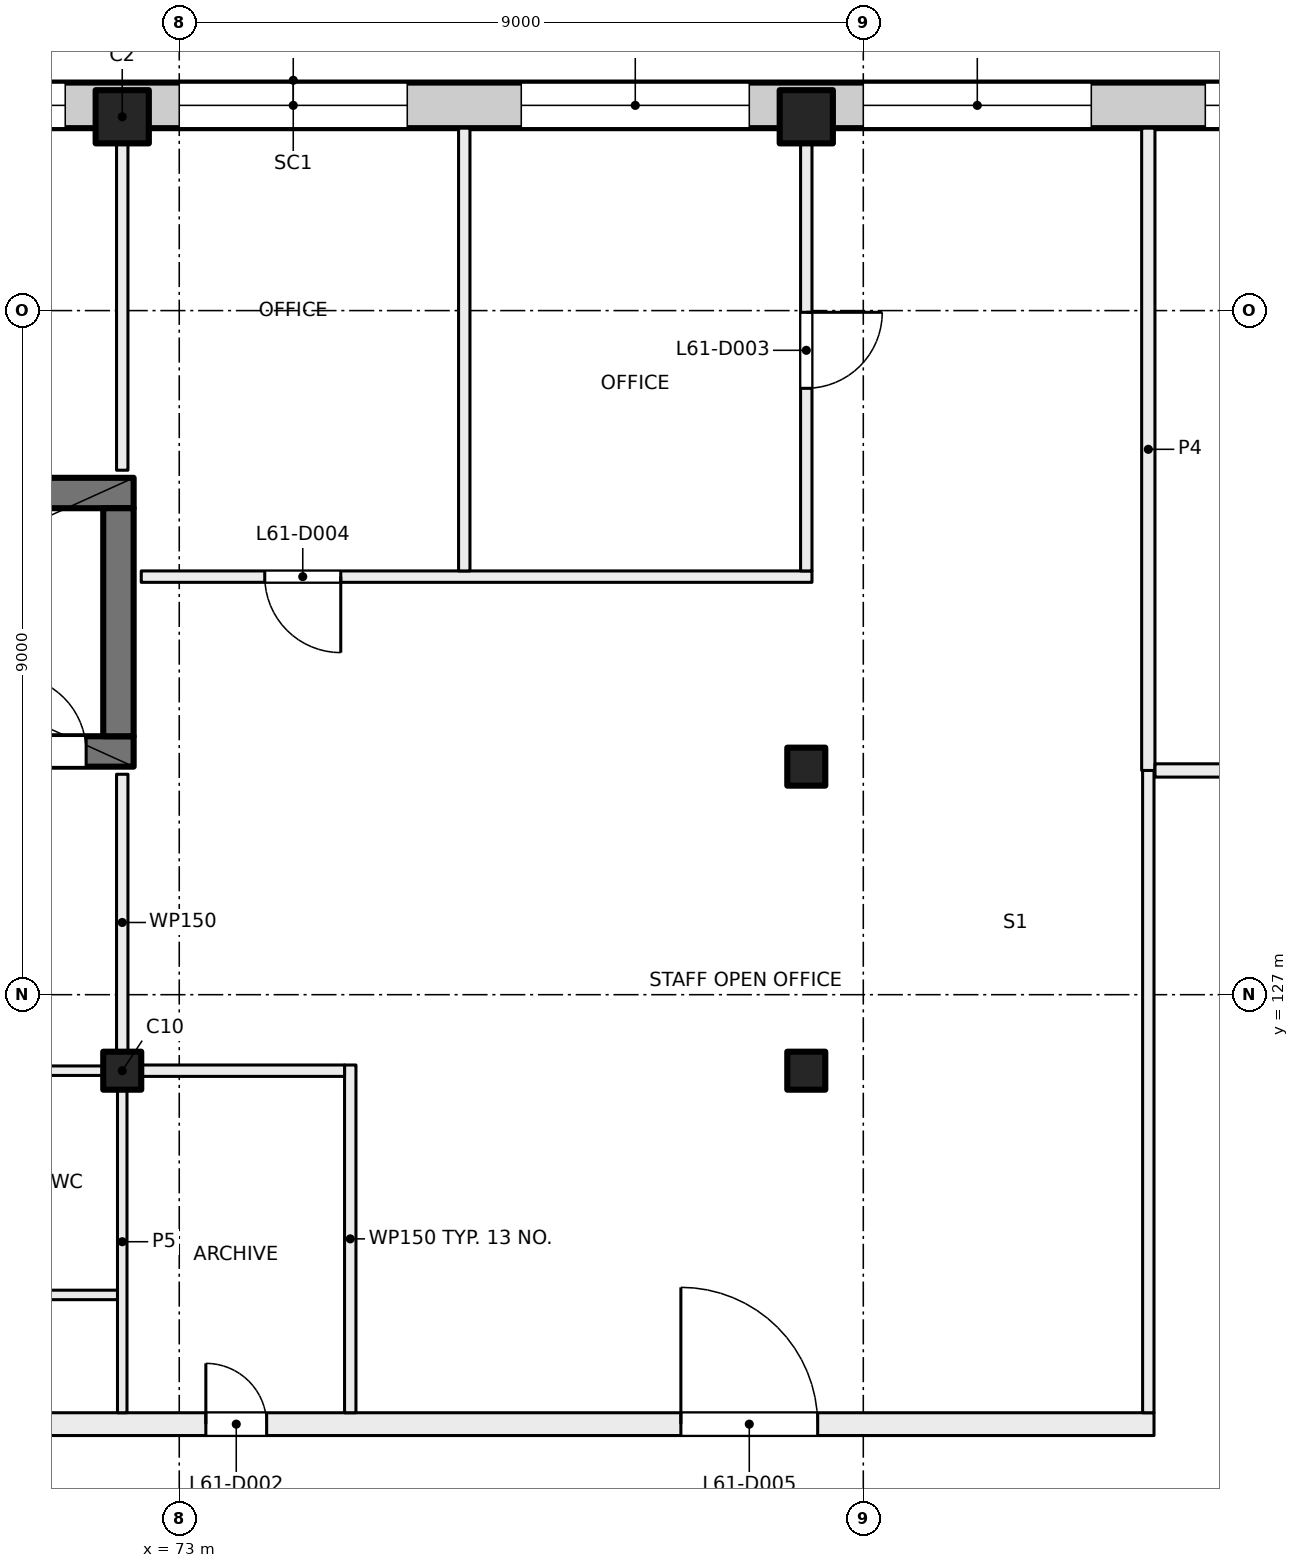
"""IFC4 building model, lengths in metres.
Left out: names, types, materials, properties, quantities, classifications, styles, units other than length and angle.
Written with IfcOpenShell. Run it as: python <this file> out.ifc"""

import sys

from ifc_helpers import new_model, si_unit, direction, frame, frame_2d, origin, origin_2d, place, context, subcontext, project, spatial, rectangle, extrude, element, fill, save


model = new_model("IFC4")
c1 = context("Model", 3, precision=1e-05, world=origin(), true_north=direction((0.0, 1.0)))
c2 = subcontext(c1, "Body", "Model", "MODEL_VIEW")
j1 = project(units=[si_unit("LENGTHUNIT", "METRE"), si_unit("PLANEANGLEUNIT", "RADIAN")], contexts=[c1])
p1 = place(None, origin())
s1 = spatial("IfcSite", under=j1, at=p1, CompositionType="ELEMENT")
p2 = place(p1, origin())
s2 = spatial("IfcBuilding", under=s1, at=p2, CompositionType="ELEMENT")
p3 = place(p2, frame((0.0, 0.0, 257.5)))
s3 = spatial("IfcBuildingStorey", under=s2, at=p3, CompositionType="ELEMENT", Elevation=257.5)
for number, where, z_axis, x_axis in (
    (1, (81.25, 130.0, 0.0), (0.0, 0.0, 1.0), (1.0, 0.0, 0.0)),
    (2, (72.25, 126.0, 0.0), (0.0, 0.0, 1.0), (1.0, 0.0, 0.0)),
    (3, (81.25, 126.0, 0.0), (0.0, 0.0, 1.0), (1.0, 0.0, 0.0)),
):
    element("IfcColumn", number, at=place(p3, frame(where, z_axis=z_axis, x_axis=x_axis)), inside=s3, PredefinedType="COLUMN", context=c2, shape_type="SweptSolid", body=[
        extrude(rectangle(XDim=0.5, YDim=0.5, at=origin_2d()), origin(), (0.0, 0.0, 1.0), 4.0),
    ])
for number, where, z_axis, x_axis in (
    (4, (72.25, 138.55, 0.0), (0.0, 0.0, 1.0), (1.0, 0.0, 0.0)),
    (5, (81.25, 138.55, 0.0), (0.0, 0.0, 1.0), (1.0, 0.0, 0.0)),
):
    element("IfcColumn", number, at=place(p3, frame(where, z_axis=z_axis, x_axis=x_axis)), inside=s3, PredefinedType="COLUMN", context=c2, shape_type="SweptSolid", body=[
        extrude(rectangle(XDim=0.7, YDim=0.7, at=origin_2d()), origin(), (0.0, 0.0, 1.0), 4.0),
    ])
p4 = place(p3, frame((63.5, 130.2, 0.0), z_axis=(0.0, 0.0, 1.0), x_axis=(1.0, 0.0, 0.0)))
e6 = element("IfcWall", 6, at=p4, inside=s3, PredefinedType="SHEAR", context=c2, shape_type="SweptSolid", body=[
    extrude(rectangle(XDim=8.9, YDim=0.4, at=frame_2d((4.45, 0.0))), origin(), (0.0, 0.0, 1.0), 4.0),
])
p5 = place(p4, frame((7.275, 0.0, 0.0)))
e7 = element("IfcOpeningElement", 7, at=p5, cuts=e6, PredefinedType="OPENING", context=c2, shape_type="SweptSolid", body=[
    extrude(rectangle(XDim=1.0, YDim=2.1, at=frame_2d((0.5, 1.05))), frame((0.0, 0.21, 0.0), z_axis=(0.0, -1.0, 0.0), x_axis=(1.0, 0.0, 0.0)), (0.0, 0.0, 1.0), 0.42),
])
p6 = place(p3, frame((64.0, 133.6, 0.0), z_axis=(0.0, 0.0, 1.0), x_axis=(1.0, 0.0, 0.0)))
e8 = element("IfcWall", 8, at=p6, inside=s3, PredefinedType="SHEAR", context=c2, shape_type="SweptSolid", body=[
    extrude(rectangle(XDim=8.4, YDim=0.4, at=frame_2d((4.2, 0.0))), origin(), (0.0, 0.0, 1.0), 4.0),
])
p7 = place(p3, frame((72.2, 130.4, 0.0), z_axis=(0.0, 0.0, 1.0), x_axis=(0.0, 1.0, 0.0)))
e9 = element("IfcWall", 9, at=p7, inside=s3, PredefinedType="SHEAR", context=c2, shape_type="SweptSolid", body=[
    extrude(rectangle(XDim=3.0, YDim=0.4, at=frame_2d((1.5, 0.0))), origin(), (0.0, 0.0, 1.0), 4.0),
])
p8 = place(p3, frame((47.07, 138.7, 0.0), z_axis=(0.0, 0.0, 1.0), x_axis=(1.0, 0.0, 0.0)))
e10 = element("IfcWall", 10, at=p8, inside=s3, PredefinedType="SOLIDWALL", context=c2, shape_type="SweptSolid", body=[
    extrude(rectangle(XDim=43.91, YDim=0.6, at=frame_2d((21.955, 0.0))), origin(), (0.0, 0.0, 1.0), 3.625),
])
p9 = place(p8, frame((3.43, 0.0, 0.9)))
e11 = element("IfcOpeningElement", 11, at=p9, cuts=e10, PredefinedType="OPENING", context=c2, shape_type="SweptSolid", body=[
    extrude(rectangle(XDim=3.0, YDim=2.4, at=frame_2d((1.5, 1.2))), frame((0.0, 0.31, 0.0), z_axis=(0.0, -1.0, 0.0), x_axis=(1.0, 0.0, 0.0)), (0.0, 0.0, 1.0), 0.62),
])
p10 = place(p8, frame((7.93, 0.0, 0.9)))
e12 = element("IfcOpeningElement", 12, at=p10, cuts=e10, PredefinedType="OPENING", context=c2, shape_type="SweptSolid", body=[
    extrude(rectangle(XDim=3.0, YDim=2.4, at=frame_2d((1.5, 1.2))), frame((0.0, 0.31, 0.0), z_axis=(0.0, -1.0, 0.0), x_axis=(1.0, 0.0, 0.0)), (0.0, 0.0, 1.0), 0.62),
])
p11 = place(p8, frame((12.43, 0.0, 0.9)))
e13 = element("IfcOpeningElement", 13, at=p11, cuts=e10, PredefinedType="OPENING", context=c2, shape_type="SweptSolid", body=[
    extrude(rectangle(XDim=3.0, YDim=2.4, at=frame_2d((1.5, 1.2))), frame((0.0, 0.31, 0.0), z_axis=(0.0, -1.0, 0.0), x_axis=(1.0, 0.0, 0.0)), (0.0, 0.0, 1.0), 0.62),
])
p12 = place(p8, frame((16.93, 0.0, 0.9)))
e14 = element("IfcOpeningElement", 14, at=p12, cuts=e10, PredefinedType="OPENING", context=c2, shape_type="SweptSolid", body=[
    extrude(rectangle(XDim=3.0, YDim=2.4, at=frame_2d((1.5, 1.2))), frame((0.0, 0.31, 0.0), z_axis=(0.0, -1.0, 0.0), x_axis=(1.0, 0.0, 0.0)), (0.0, 0.0, 1.0), 0.62),
])
p13 = place(p8, frame((21.43, 0.0, 0.9)))
e15 = element("IfcOpeningElement", 15, at=p13, cuts=e10, PredefinedType="OPENING", context=c2, shape_type="SweptSolid", body=[
    extrude(rectangle(XDim=3.0, YDim=2.4, at=frame_2d((1.5, 1.2))), frame((0.0, 0.31, 0.0), z_axis=(0.0, -1.0, 0.0), x_axis=(1.0, 0.0, 0.0)), (0.0, 0.0, 1.0), 0.62),
])
p14 = place(p8, frame((25.93, 0.0, 0.9)))
e16 = element("IfcOpeningElement", 16, at=p14, cuts=e10, PredefinedType="OPENING", context=c2, shape_type="SweptSolid", body=[
    extrude(rectangle(XDim=3.0, YDim=2.4, at=frame_2d((1.5, 1.2))), frame((0.0, 0.31, 0.0), z_axis=(0.0, -1.0, 0.0), x_axis=(1.0, 0.0, 0.0)), (0.0, 0.0, 1.0), 0.62),
])
p15 = place(p8, frame((30.43, 0.0, 0.9)))
e17 = element("IfcOpeningElement", 17, at=p15, cuts=e10, PredefinedType="OPENING", context=c2, shape_type="SweptSolid", body=[
    extrude(rectangle(XDim=3.0, YDim=2.4, at=frame_2d((1.5, 1.2))), frame((0.0, 0.31, 0.0), z_axis=(0.0, -1.0, 0.0), x_axis=(1.0, 0.0, 0.0)), (0.0, 0.0, 1.0), 0.62),
])
p16 = place(p8, frame((34.93, 0.0, 0.9)))
e18 = element("IfcOpeningElement", 18, at=p16, cuts=e10, PredefinedType="OPENING", context=c2, shape_type="SweptSolid", body=[
    extrude(rectangle(XDim=3.0, YDim=2.4, at=frame_2d((1.5, 1.2))), frame((0.0, 0.31, 0.0), z_axis=(0.0, -1.0, 0.0), x_axis=(1.0, 0.0, 0.0)), (0.0, 0.0, 1.0), 0.62),
])
p17 = place(p8, frame((39.43, 0.0, 0.9)))
e19 = element("IfcOpeningElement", 19, at=p17, cuts=e10, PredefinedType="OPENING", context=c2, shape_type="SweptSolid", body=[
    extrude(rectangle(XDim=3.0, YDim=2.4, at=frame_2d((1.5, 1.2))), frame((0.0, 0.31, 0.0), z_axis=(0.0, -1.0, 0.0), x_axis=(1.0, 0.0, 0.0)), (0.0, 0.0, 1.0), 0.62),
])
p18 = place(p3, frame((54.4, 121.35, 0.0), z_axis=(0.0, 0.0, 1.0), x_axis=(1.0, 0.0, 0.0)))
e20 = element("IfcWall", 20, at=p18, inside=s3, PredefinedType="PARTITIONING", context=c2, shape_type="SweptSolid", body=[
    extrude(rectangle(XDim=31.425, YDim=0.3, at=frame_2d((15.712, 0.0))), origin(), (0.0, 0.0, 1.0), 3.625),
])
p19 = place(p18, frame((18.95, 0.0, 0.0)))
e21 = element("IfcOpeningElement", 21, at=p19, cuts=e20, PredefinedType="OPENING", context=c2, shape_type="SweptSolid", body=[
    extrude(rectangle(XDim=0.8, YDim=2.1, at=frame_2d((0.4, 1.05))), frame((0.0, 0.16, 0.0), z_axis=(0.0, -1.0, 0.0), x_axis=(1.0, 0.0, 0.0)), (0.0, 0.0, 1.0), 0.32),
])
p20 = place(p18, frame((25.2, 0.0, 0.0)))
e22 = element("IfcOpeningElement", 22, at=p20, cuts=e20, PredefinedType="OPENING", context=c2, shape_type="SweptSolid", body=[
    extrude(rectangle(XDim=1.8, YDim=2.1, at=frame_2d((0.9, 1.05))), frame((0.0, 0.16, 0.0), z_axis=(0.0, -1.0, 0.0), x_axis=(1.0, 0.0, 0.0)), (0.0, 0.0, 1.0), 0.32),
])
p21 = place(p18, frame((12.85, 0.0, 0.0)))
e23 = element("IfcOpeningElement", 23, at=p21, cuts=e20, PredefinedType="OPENING", context=c2, shape_type="SweptSolid", body=[
    extrude(rectangle(XDim=1.0, YDim=2.1, at=frame_2d((0.5, 1.05))), frame((0.0, 0.16, 0.0), z_axis=(0.0, -1.0, 0.0), x_axis=(1.0, 0.0, 0.0)), (0.0, 0.0, 1.0), 0.32),
])
p22 = place(p18, frame((3.515, 0.0, 0.0)))
e24 = element("IfcOpeningElement", 24, at=p22, cuts=e20, PredefinedType="OPENING", context=c2, shape_type="SweptSolid", body=[
    extrude(rectangle(XDim=1.8, YDim=2.1, at=frame_2d((0.9, 1.05))), frame((0.0, 0.16, 0.0), z_axis=(0.0, -1.0, 0.0), x_axis=(1.0, 0.0, 0.0)), (0.0, 0.0, 1.0), 0.32),
])
p23 = place(p3, frame((63.312, 123.05, 0.0), z_axis=(0.0, 0.0, 1.0), x_axis=(1.0, 0.0, 0.0)))
e25 = element("IfcWall", 25, at=p23, inside=s3, PredefinedType="PARTITIONING", context=c2, shape_type="SweptSolid", body=[
    extrude(rectangle(XDim=8.876, YDim=0.125, at=frame_2d((4.438, 0.0))), origin(), (0.0, 0.0, 1.0), 3.625),
])
p24 = place(p23, frame((6.817, 0.0, 0.0)))
e26 = element("IfcOpeningElement", 26, at=p24, cuts=e25, PredefinedType="OPENING", context=c2, shape_type="SweptSolid", body=[
    extrude(rectangle(XDim=0.8, YDim=2.1, at=frame_2d((0.4, 1.05))), frame((0.0, 0.073, 0.0), z_axis=(0.0, -1.0, 0.0), x_axis=(1.0, 0.0, 0.0)), (0.0, 0.0, 1.0), 0.145),
])
p25 = place(p23, frame((3.638, 0.0, 0.0)))
e27 = element("IfcOpeningElement", 27, at=p25, cuts=e25, PredefinedType="OPENING", context=c2, shape_type="SweptSolid", body=[
    extrude(rectangle(XDim=0.8, YDim=2.1, at=frame_2d((0.4, 1.05))), frame((0.0, 0.073, 0.0), z_axis=(0.0, -1.0, 0.0), x_axis=(1.0, 0.0, 0.0)), (0.0, 0.0, 1.0), 0.145),
])
p26 = place(p23, frame((0.759, 0.0, 0.0)))
e28 = element("IfcOpeningElement", 28, at=p26, cuts=e25, PredefinedType="OPENING", context=c2, shape_type="SweptSolid", body=[
    extrude(rectangle(XDim=1.0, YDim=2.1, at=frame_2d((0.5, 1.05))), frame((0.0, 0.073, 0.0), z_axis=(0.0, -1.0, 0.0), x_axis=(1.0, 0.0, 0.0)), (0.0, 0.0, 1.0), 0.145),
])
p27 = place(p3, frame((63.188, 126.0, 0.0), z_axis=(0.0, 0.0, 1.0), x_axis=(1.0, 0.0, 0.0)))
e29 = element("IfcWall", 29, at=p27, inside=s3, PredefinedType="PARTITIONING", context=c2, shape_type="SweptSolid", body=[
    extrude(rectangle(XDim=9.062, YDim=0.125, at=frame_2d((4.531, 0.0))), origin(), (0.0, 0.0, 1.0), 3.625),
])
p28 = place(p3, frame((72.25, 126.0, 0.0), z_axis=(0.0, 0.0, 1.0), x_axis=(0.0, -1.0, 0.0)))
e30 = element("IfcWall", 30, at=p28, inside=s3, PredefinedType="PARTITIONING", context=c2, shape_type="SweptSolid", body=[
    extrude(rectangle(XDim=4.5, YDim=0.125, at=frame_2d((2.25, 0.0))), origin(), (0.0, 0.0, 1.0), 3.625),
])
p29 = place(p3, frame((72.25, 126.0, 0.0), z_axis=(0.0, 0.0, 1.0), x_axis=(0.0, 1.0, 0.0)))
e31 = element("IfcWall", 31, at=p29, inside=s3, PredefinedType="PARTITIONING", context=c2, shape_type="SweptSolid", body=[
    extrude(rectangle(XDim=3.9, YDim=0.15, at=frame_2d((1.95, 0.0))), origin(), (0.0, 0.0, 1.0), 3.625),
])
p30 = place(p3, frame((72.25, 133.9, 0.0), z_axis=(0.0, 0.0, 1.0), x_axis=(0.0, 1.0, 0.0)))
e32 = element("IfcWall", 32, at=p30, inside=s3, PredefinedType="PARTITIONING", context=c2, shape_type="SweptSolid", body=[
    extrude(rectangle(XDim=4.5, YDim=0.15, at=frame_2d((2.25, 0.0))), origin(), (0.0, 0.0, 1.0), 3.625),
])
p31 = place(p3, frame((81.325, 132.5, 0.0), z_axis=(0.0, 0.0, 1.0), x_axis=(-1.0, 0.0, 0.0)))
e33 = element("IfcWall", 33, at=p31, inside=s3, PredefinedType="PARTITIONING", context=c2, shape_type="SweptSolid", body=[
    extrude(rectangle(XDim=8.825, YDim=0.15, at=frame_2d((4.413, 0.0))), origin(), (0.0, 0.0, 1.0), 3.625),
])
p32 = place(p31, frame((6.2, 0.0, 0.0)))
e34 = element("IfcOpeningElement", 34, at=p32, cuts=e33, PredefinedType="OPENING", context=c2, shape_type="SweptSolid", body=[
    extrude(rectangle(XDim=1.0, YDim=2.1, at=frame_2d((0.5, 1.05))), frame((0.0, 0.085, 0.0), z_axis=(0.0, -1.0, 0.0), x_axis=(1.0, 0.0, 0.0)), (0.0, 0.0, 1.0), 0.17),
])
p33 = place(p3, frame((75.25, 121.5, 0.0), z_axis=(0.0, 0.0, 1.0), x_axis=(0.0, 1.0, 0.0)))
e35 = element("IfcWall", 35, at=p33, inside=s3, PredefinedType="PARTITIONING", context=c2, shape_type="SweptSolid", body=[
    extrude(rectangle(XDim=4.575, YDim=0.15, at=frame_2d((2.288, 0.0))), origin(), (0.0, 0.0, 1.0), 3.625),
])
p34 = place(p3, frame((75.175, 126.0, 0.0), z_axis=(0.0, 0.0, 1.0), x_axis=(-1.0, 0.0, 0.0)))
e36 = element("IfcWall", 36, at=p34, inside=s3, PredefinedType="PARTITIONING", context=c2, shape_type="SweptSolid", body=[
    extrude(rectangle(XDim=2.925, YDim=0.15, at=frame_2d((1.462, 0.0))), origin(), (0.0, 0.0, 1.0), 3.625),
])
p35 = place(p3, frame((76.75, 132.575, 0.0), z_axis=(0.0, 0.0, 1.0), x_axis=(0.0, 1.0, 0.0)))
e37 = element("IfcWall", 37, at=p35, inside=s3, PredefinedType="PARTITIONING", context=c2, shape_type="SweptSolid", body=[
    extrude(rectangle(XDim=5.825, YDim=0.15, at=frame_2d((2.913, 0.0))), origin(), (0.0, 0.0, 1.0), 3.625),
])
p36 = place(p3, frame((81.25, 138.4, 0.0), z_axis=(0.0, 0.0, 1.0), x_axis=(0.0, -1.0, 0.0)))
e38 = element("IfcWall", 38, at=p36, inside=s3, PredefinedType="PARTITIONING", context=c2, shape_type="SweptSolid", body=[
    extrude(rectangle(XDim=5.825, YDim=0.15, at=frame_2d((2.913, 0.0))), origin(), (0.0, 0.0, 1.0), 3.625),
])
p37 = place(p36, frame((2.423, 0.0, 0.0)))
e39 = element("IfcOpeningElement", 39, at=p37, cuts=e38, PredefinedType="OPENING", context=c2, shape_type="SweptSolid", body=[
    extrude(rectangle(XDim=1.0, YDim=2.1, at=frame_2d((0.5, 1.05))), frame((0.0, 0.085, 0.0), z_axis=(0.0, -1.0, 0.0), x_axis=(1.0, 0.0, 0.0)), (0.0, 0.0, 1.0), 0.17),
])
p38 = place(p3, frame((85.75, 121.5, 0.0), z_axis=(0.0, 0.0, 1.0), x_axis=(0.0, 1.0, 0.0)))
e40 = element("IfcWall", 40, at=p38, inside=s3, PredefinedType="PARTITIONING", context=c2, shape_type="SweptSolid", body=[
    extrude(rectangle(XDim=8.45, YDim=0.15, at=frame_2d((4.225, 0.0))), origin(), (0.0, 0.0, 1.0), 3.625),
])
p39 = place(p3, frame((85.75, 129.95, 0.0), z_axis=(0.0, 0.0, 1.0), x_axis=(0.0, 1.0, 0.0)))
e41 = element("IfcWall", 41, at=p39, inside=s3, PredefinedType="PARTITIONING", context=c2, shape_type="SweptSolid", body=[
    extrude(rectangle(XDim=8.45, YDim=0.175, at=frame_2d((4.225, 0.0))), origin(), (0.0, 0.0, 1.0), 3.625),
])
p40 = place(p3, frame((85.838, 129.95, 0.0), z_axis=(0.0, 0.0, 1.0), x_axis=(1.0, 0.0, 0.0)))
e42 = element("IfcWall", 42, at=p40, inside=s3, PredefinedType="PARTITIONING", context=c2, shape_type="SweptSolid", body=[
    extrude(rectangle(XDim=5.162, YDim=0.175, at=frame_2d((2.581, 0.0))), origin(), (0.0, 0.0, 1.0), 3.625),
])
p41 = place(p40, frame((1.971, 0.0, 0.0)))
e43 = element("IfcOpeningElement", 43, at=p41, cuts=e42, PredefinedType="OPENING", context=c2, shape_type="SweptSolid", body=[
    extrude(rectangle(XDim=1.2, YDim=2.1, at=frame_2d((0.6, 1.05))), frame((0.0, 0.097, 0.0), z_axis=(0.0, -1.0, 0.0), x_axis=(1.0, 0.0, 0.0)), (0.0, 0.0, 1.0), 0.195),
])
p42 = place(p13, origin())
e44 = element("IfcWindow", 44, at=p42, inside=s3, PartitioningType="SINGLE_PANEL", PredefinedType="WINDOW", context=c2, shape_type="SweptSolid", body=[
    extrude(rectangle(XDim=3.0, YDim=2.4, at=frame_2d((1.5, 1.2))), frame((0.0, 0.03, 0.0), z_axis=(0.0, -1.0, 0.0), x_axis=(1.0, 0.0, 0.0)), (0.0, 0.0, 1.0), 0.06),
])
fill(e15, e44)
p43 = place(p14, origin())
e45 = element("IfcWindow", 45, at=p43, inside=s3, PartitioningType="SINGLE_PANEL", PredefinedType="WINDOW", context=c2, shape_type="SweptSolid", body=[
    extrude(rectangle(XDim=3.0, YDim=2.4, at=frame_2d((1.5, 1.2))), frame((0.0, 0.03, 0.0), z_axis=(0.0, -1.0, 0.0), x_axis=(1.0, 0.0, 0.0)), (0.0, 0.0, 1.0), 0.06),
])
fill(e16, e45)
p44 = place(p15, origin())
e46 = element("IfcWindow", 46, at=p44, inside=s3, PartitioningType="SINGLE_PANEL", PredefinedType="WINDOW", context=c2, shape_type="SweptSolid", body=[
    extrude(rectangle(XDim=3.0, YDim=2.4, at=frame_2d((1.5, 1.2))), frame((0.0, 0.03, 0.0), z_axis=(0.0, -1.0, 0.0), x_axis=(1.0, 0.0, 0.0)), (0.0, 0.0, 1.0), 0.06),
])
fill(e17, e46)
p45 = place(p16, origin())
e47 = element("IfcWindow", 47, at=p45, inside=s3, PartitioningType="SINGLE_PANEL", PredefinedType="WINDOW", context=c2, shape_type="SweptSolid", body=[
    extrude(rectangle(XDim=3.0, YDim=2.4, at=frame_2d((1.5, 1.2))), frame((0.0, 0.03, 0.0), z_axis=(0.0, -1.0, 0.0), x_axis=(1.0, 0.0, 0.0)), (0.0, 0.0, 1.0), 0.06),
])
fill(e18, e47)
p46 = place(p17, origin())
e48 = element("IfcWindow", 48, at=p46, inside=s3, PartitioningType="SINGLE_PANEL", PredefinedType="WINDOW", context=c2, shape_type="SweptSolid", body=[
    extrude(rectangle(XDim=3.0, YDim=2.4, at=frame_2d((1.5, 1.2))), frame((0.0, 0.03, 0.0), z_axis=(0.0, -1.0, 0.0), x_axis=(1.0, 0.0, 0.0)), (0.0, 0.0, 1.0), 0.06),
])
fill(e19, e48)
p47 = place(p5, origin())
e49 = element("IfcDoor", 49, at=p47, inside=s3, OperationType="SINGLE_SWING_LEFT", PredefinedType="DOOR", context=c2, shape_type="SweptSolid", body=[
    extrude(rectangle(XDim=1.0, YDim=2.1, at=frame_2d((0.5, 1.05))), frame((0.0, 0.025, 0.0), z_axis=(0.0, -1.0, 0.0), x_axis=(1.0, 0.0, 0.0)), (0.0, 0.0, 1.0), 0.05),
])
fill(e7, e49)
p48 = place(p19, origin())
e50 = element("IfcDoor", 50, at=p48, inside=s3, OperationType="SINGLE_SWING_LEFT", PredefinedType="DOOR", context=c2, shape_type="SweptSolid", body=[
    extrude(rectangle(XDim=0.8, YDim=2.1, at=frame_2d((0.4, 1.05))), frame((0.0, 0.025, 0.0), z_axis=(0.0, -1.0, 0.0), x_axis=(1.0, 0.0, 0.0)), (0.0, 0.0, 1.0), 0.05),
])
fill(e21, e50)
p49 = place(p37, origin())
e51 = element("IfcDoor", 51, at=p49, inside=s3, OperationType="SINGLE_SWING_LEFT", PredefinedType="DOOR", context=c2, shape_type="SweptSolid", body=[
    extrude(rectangle(XDim=1.0, YDim=2.1, at=frame_2d((0.5, 1.05))), frame((0.0, 0.025, 0.0), z_axis=(0.0, -1.0, 0.0), x_axis=(1.0, 0.0, 0.0)), (0.0, 0.0, 1.0), 0.05),
])
fill(e39, e51)
p50 = place(p32, origin())
e52 = element("IfcDoor", 52, at=p50, inside=s3, OperationType="SINGLE_SWING_RIGHT", PredefinedType="DOOR", context=c2, shape_type="SweptSolid", body=[
    extrude(rectangle(XDim=1.0, YDim=2.1, at=frame_2d((0.5, 1.05))), frame((0.0, 0.025, 0.0), z_axis=(0.0, -1.0, 0.0), x_axis=(1.0, 0.0, 0.0)), (0.0, 0.0, 1.0), 0.05),
])
fill(e34, e52)
p51 = place(p20, origin())
e53 = element("IfcDoor", 53, at=p51, inside=s3, OperationType="DOUBLE_DOOR_SINGLE_SWING", PredefinedType="DOOR", context=c2, shape_type="SweptSolid", body=[
    extrude(rectangle(XDim=1.8, YDim=2.1, at=frame_2d((0.9, 1.05))), frame((0.0, 0.025, 0.0), z_axis=(0.0, -1.0, 0.0), x_axis=(1.0, 0.0, 0.0)), (0.0, 0.0, 1.0), 0.05),
])
fill(e22, e53)
save(model, sys.argv[1])
